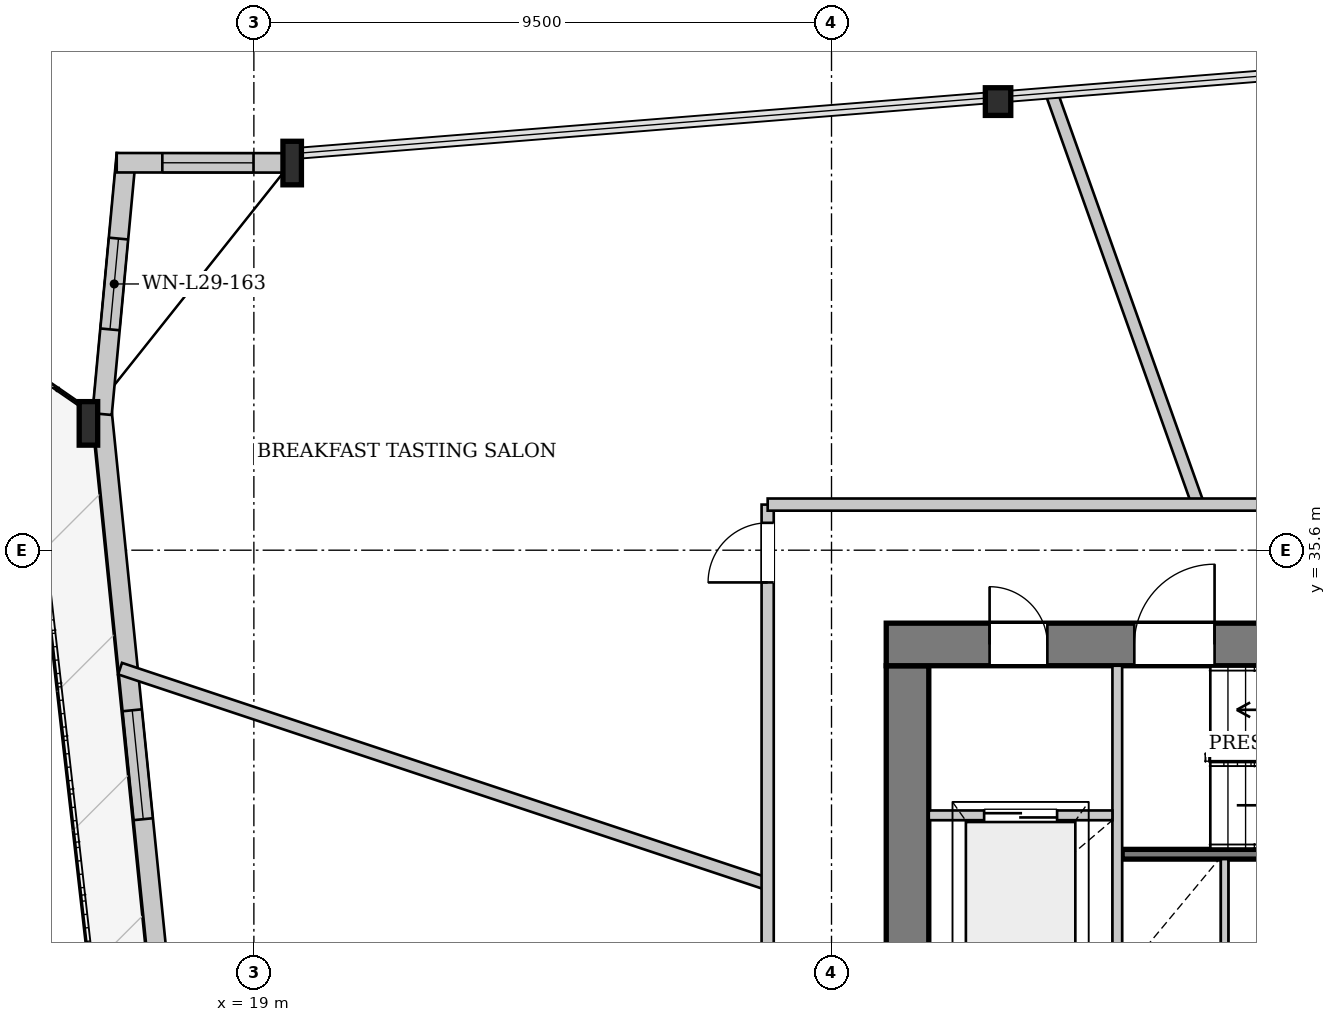
"""IFC4 building model, lengths in metres.
Left out: names, types, materials, properties, quantities, classifications, styles, units other than length and angle.
Written with IfcOpenShell. Run it as: python <this file> out.ifc"""

import sys

from ifc_helpers import new_model, si_unit, direction, frame, frame_2d, origin, origin_2d, place, context, subcontext, project, spatial, rectangle, i_section, extrude, source, transform, mapped, element, fill, save


model = new_model("IFC4")
c1 = context("Model", 3, precision=1e-05, world=origin(), true_north=direction((0.0, 1.0)))
c2 = subcontext(c1, "Body", "Model", "MODEL_VIEW")
j1 = project(units=[si_unit("LENGTHUNIT", "METRE"), si_unit("PLANEANGLEUNIT", "RADIAN")], contexts=[c1])
p1 = place(None, origin())
s1 = spatial("IfcSite", under=j1, at=p1, CompositionType="ELEMENT")
p2 = place(p1, origin())
s2 = spatial("IfcBuilding", under=s1, at=p2, CompositionType="ELEMENT")
p3 = place(p2, frame((0.0, 0.0, 112.8)))
s3 = spatial("IfcBuildingStorey", under=s2, at=p3, CompositionType="ELEMENT", Elevation=112.8)
m1 = source(origin(), c2, "Body", "SweptSolid", [
    extrude(i_section(OverallWidth=0.418, OverallDepth=0.455, WebThickness=0.038, FlangeThickness=0.059, at=origin_2d()), origin(), (0.0, 0.0, 1.0), 3.399),
])
p4 = place(p3, frame((31.369, 43.061, 0.0), z_axis=(-0.076208404136, -0.049129640367, 0.995880794863), x_axis=(0.541838144315, -0.840482852511, 0.0)))
e1 = element("IfcColumn", 1, at=p4, inside=s3, PredefinedType="COLUMN", context=c2, shape_type="MappedRepresentation", body=[
    mapped(m1, transform((0.0, 0.0, 0.0), x_axis=(1.0, 0.0, 0.0), y_axis=(0.0, 1.0, 0.0), z_axis=(0.0, 0.0, 1.0), scale=1.0)),
])
m2 = source(origin(), c2, "Body", "SweptSolid", [
    extrude(i_section(OverallWidth=0.304, OverallDepth=0.716, WebThickness=0.021, FlangeThickness=0.04, at=origin_2d()), origin(), (0.0, 0.0, 1.0), 3.408),
])
p5 = place(p3, frame((19.745, 42.129, 0.0), z_axis=(-0.067332747492, -0.095411935807, 0.993158025503), x_axis=(0.817035854661, -0.5765868644, 0.0)))
e2 = element("IfcColumn", 2, at=p5, inside=s3, PredefinedType="COLUMN", context=c2, shape_type="MappedRepresentation", body=[
    mapped(m2, transform((0.0, 0.0, 0.0), x_axis=(1.0, 0.0, 0.0), y_axis=(0.0, 1.0, 0.0), z_axis=(0.0, 0.0, 1.0), scale=1.0)),
])
m3 = source(origin(), c2, "Body", "SweptSolid", [
    extrude(i_section(OverallWidth=0.304, OverallDepth=0.716, WebThickness=0.021, FlangeThickness=0.04, at=origin_2d()), origin(), (0.0, 0.0, 1.0), 3.404),
])
p6 = place(p3, frame((16.344, 37.854, 0.0), z_axis=(-0.038083007861, -0.098685911143, 0.994389649712), x_axis=(0.9329431075, -0.360023830002, 0.0)))
e3 = element("IfcColumn", 3, at=p6, inside=s3, PredefinedType="COLUMN", context=c2, shape_type="MappedRepresentation", body=[
    mapped(m3, transform((0.0, 0.0, 0.0), x_axis=(1.0, 0.0, 0.0), y_axis=(0.0, 1.0, 0.0), z_axis=(0.0, 0.0, 1.0), scale=1.0)),
])
p7 = place(p3, frame((18.334, 19.781, 0.0), z_axis=(0.0, 0.0, 1.0), x_axis=(-0.1006962092, 0.994917219397, 0.0)))
e4 = element("IfcWall", 4, at=p7, inside=s3, PredefinedType="SOLIDWALL", context=c2, shape_type="SweptSolid", body=[
    extrude(rectangle(XDim=18.182, YDim=0.32, at=frame_2d((9.091, 0.0))), origin(), (0.0, 0.0, 1.0), 2.692),
])
p8 = place(p7, frame((5.268, 0.0, 0.0)))
e5 = element("IfcOpeningElement", 5, at=p8, cuts=e4, PredefinedType="OPENING", context=c2, shape_type="SweptSolid", body=[
    extrude(rectangle(XDim=1.1, YDim=2.3, at=frame_2d((0.55, 1.15))), frame((0.0, 0.17, 0.0), z_axis=(0.0, -1.0, 0.0), x_axis=(1.0, 0.0, 0.0)), (0.0, 0.0, 1.0), 0.34),
])
p9 = place(p7, frame((11.454, 0.0, 0.372)))
e6 = element("IfcOpeningElement", 6, at=p9, cuts=e4, PredefinedType="OPENING", context=c2, shape_type="SweptSolid", body=[
    extrude(rectangle(XDim=1.8, YDim=2.2, at=frame_2d((0.9, 1.1))), frame((0.0, 0.17, 0.0), z_axis=(0.0, -1.0, 0.0), x_axis=(1.0, 0.0, 0.0)), (0.0, 0.0, 1.0), 0.34),
])
p10 = place(p3, frame((16.503, 37.839, 0.0), z_axis=(0.0, 0.0, 1.0), x_axis=(0.093173512917, 0.995649886502, 0.0)))
e7 = element("IfcWall", 7, at=p10, inside=s3, PredefinedType="SOLIDWALL", context=c2, shape_type="SweptSolid", body=[
    extrude(rectangle(XDim=4.297, YDim=0.32, at=frame_2d((2.149, 0.0))), origin(), (0.0, 0.0, 1.0), 2.692),
])
p11 = place(p10, frame((1.399, 0.0, 0.272)))
e8 = element("IfcOpeningElement", 8, at=p11, cuts=e7, PredefinedType="OPENING", context=c2, shape_type="SweptSolid", body=[
    extrude(rectangle(XDim=1.5, YDim=2.3, at=frame_2d((0.75, 1.15))), frame((0.0, 0.17, 0.0), z_axis=(0.0, -1.0, 0.0), x_axis=(1.0, 0.0, 0.0)), (0.0, 0.0, 1.0), 0.34),
])
p12 = place(p3, frame((16.744, 41.972, 0.0), z_axis=(0.0, 0.0, 1.0), x_axis=(0.999999668971, -0.000813669381, 0.0)))
e9 = element("IfcWall", 9, at=p12, inside=s3, PredefinedType="SOLIDWALL", context=c2, shape_type="SweptSolid", body=[
    extrude(rectangle(XDim=3.0, YDim=0.32, at=frame_2d((1.5, 0.0))), origin(), (0.0, 0.0, 1.0), 2.692),
])
p13 = place(p12, frame((0.75, 0.0, 0.272)))
e10 = element("IfcOpeningElement", 10, at=p13, cuts=e9, PredefinedType="OPENING", context=c2, shape_type="SweptSolid", body=[
    extrude(rectangle(XDim=1.5, YDim=2.3, at=frame_2d((0.75, 1.15))), frame((0.0, 0.17, 0.0), z_axis=(0.0, -1.0, 0.0), x_axis=(1.0, 0.0, 0.0)), (0.0, 0.0, 1.0), 0.34),
])
p14 = place(p3, frame((29.75, 19.5, 0.0), z_axis=(0.0, 0.0, 1.0), x_axis=(0.0, 1.0, 0.0)))
e11 = element("IfcWall", 11, at=p14, inside=s3, PredefinedType="SHEAR", context=c2, shape_type="SweptSolid", body=[
    extrude(rectangle(XDim=14.2, YDim=0.7, at=frame_2d((7.1, 0.0))), origin(), (0.0, 0.0, 1.0), 3.3),
])
p15 = place(p14, frame((7.42, 0.0, 0.0)))
e12 = element("IfcOpeningElement", 12, at=p15, cuts=e11, PredefinedType="OPENING", context=c2, shape_type="SweptSolid", body=[
    extrude(rectangle(XDim=1.6, YDim=2.2, at=frame_2d((0.8, 1.1))), frame((0.0, 0.36, 0.0), z_axis=(0.0, -1.0, 0.0), x_axis=(1.0, 0.0, 0.0)), (0.0, 0.0, 1.0), 0.72),
])
p16 = place(p3, frame((29.4, 34.05, 0.0), z_axis=(0.0, 0.0, 1.0), x_axis=(1.0, 0.0, 0.0)))
e13 = element("IfcWall", 13, at=p16, inside=s3, PredefinedType="SHEAR", context=c2, shape_type="SweptSolid", body=[
    extrude(rectangle(XDim=17.2, YDim=0.7, at=frame_2d((8.6, 0.0))), origin(), (0.0, 0.0, 1.0), 3.3),
])
p17 = place(p16, frame((1.7, 0.0, 0.0)))
e14 = element("IfcOpeningElement", 14, at=p17, cuts=e13, PredefinedType="OPENING", context=c2, shape_type="SweptSolid", body=[
    extrude(rectangle(XDim=0.95, YDim=2.1, at=frame_2d((0.475, 1.05))), frame((0.0, 0.36, 0.0), z_axis=(0.0, -1.0, 0.0), x_axis=(1.0, 0.0, 0.0)), (0.0, 0.0, 1.0), 0.72),
])
p18 = place(p16, frame((4.08, 0.0, 0.0)))
e15 = element("IfcOpeningElement", 15, at=p18, cuts=e13, PredefinedType="OPENING", context=c2, shape_type="SweptSolid", body=[
    extrude(rectangle(XDim=1.32, YDim=2.2, at=frame_2d((0.66, 1.1))), frame((0.0, 0.36, 0.0), z_axis=(0.0, -1.0, 0.0), x_axis=(1.0, 0.0, 0.0)), (0.0, 0.0, 1.0), 0.72),
])
p19 = place(p16, frame((15.15, 0.0, 0.0)))
e16 = element("IfcOpeningElement", 16, at=p19, cuts=e13, PredefinedType="OPENING", context=c2, shape_type="SweptSolid", body=[
    extrude(rectangle(XDim=0.95, YDim=2.1, at=frame_2d((0.475, 1.05))), frame((0.0, 0.36, 0.0), z_axis=(0.0, -1.0, 0.0), x_axis=(1.0, 0.0, 0.0)), (0.0, 0.0, 1.0), 0.72),
])
p20 = place(p3, frame((33.28, 30.6, 0.0), z_axis=(0.0, 0.0, 1.0), x_axis=(1.0, 0.0, 0.0)))
e17 = element("IfcWall", 17, at=p20, inside=s3, PredefinedType="PARTITIONING", context=c2, shape_type="SweptSolid", body=[
    extrude(rectangle(XDim=7.3, YDim=0.16, at=frame_2d((3.65, 0.0))), origin(), (0.0, 0.0, 1.0), 3.3),
])
p21 = place(p3, frame((33.2, 28.44, 0.0), z_axis=(0.0, 0.0, 1.0), x_axis=(0.0, 1.0, 0.0)))
e18 = element("IfcWall", 18, at=p21, inside=s3, PredefinedType="PARTITIONING", context=c2, shape_type="SweptSolid", body=[
    extrude(rectangle(XDim=5.26, YDim=0.16, at=frame_2d((2.63, 0.0))), origin(), (0.0, 0.0, 1.0), 3.3),
])
p22 = place(p3, frame((30.1, 31.24, 0.0), z_axis=(0.0, 0.0, 1.0), x_axis=(1.0, 0.0, 0.0)))
e19 = element("IfcWall", 19, at=p22, inside=s3, PredefinedType="PARTITIONING", context=c2, shape_type="SweptSolid", body=[
    extrude(rectangle(XDim=3.02, YDim=0.16, at=frame_2d((1.51, 0.0))), origin(), (0.0, 0.0, 1.0), 3.3),
])
p23 = place(p22, frame((0.91, 0.0, 0.0)))
e20 = element("IfcOpeningElement", 20, at=p23, cuts=e19, PredefinedType="OPENING", context=c2, shape_type="SweptSolid", body=[
    extrude(rectangle(XDim=1.2, YDim=2.2, at=frame_2d((0.6, 1.1))), frame((0.0, 0.09, 0.0), z_axis=(0.0, -1.0, 0.0), x_axis=(1.0, 0.0, 0.0)), (0.0, 0.0, 1.0), 0.18),
])
p24 = place(p3, frame((34.965, 28.6, 0.0), z_axis=(0.0, 0.0, 1.0), x_axis=(0.0, 1.0, 0.0)))
e21 = element("IfcWall", 21, at=p24, inside=s3, PredefinedType="PARTITIONING", context=c2, shape_type="SweptSolid", body=[
    extrude(rectangle(XDim=1.92, YDim=0.125, at=frame_2d((0.96, 0.0))), origin(), (0.0, 0.0, 1.0), 3.3),
])
p25 = place(p3, frame((34.528, 36.35, 0.0), z_axis=(0.0, 0.0, 1.0), x_axis=(-0.335484779228, 0.942045626765, 0.0)))
e22 = element("IfcWall", 22, at=p25, inside=s3, PredefinedType="PARTITIONING", context=c2, shape_type="SweptSolid", body=[
    extrude(rectangle(XDim=7.156, YDim=0.2, at=frame_2d((3.578, 0.0))), origin(), (0.0, 0.0, 1.0), 3.3),
])
p26 = place(p3, frame((27.45, 30.11, 0.0), z_axis=(0.0, 0.0, 1.0), x_axis=(-0.948876702019, 0.315646961598, 0.0)))
e23 = element("IfcWall", 23, at=p26, inside=s3, PredefinedType="PARTITIONING", context=c2, shape_type="SweptSolid", body=[
    extrude(rectangle(XDim=11.224, YDim=0.2, at=frame_2d((5.612, 0.0))), origin(), (0.0, 0.0, 1.0), 3.3),
])
p27 = place(p3, frame((27.45, 16.85, 0.0), z_axis=(0.0, 0.0, 1.0), x_axis=(0.0, 1.0, 0.0)))
e24 = element("IfcWall", 24, at=p27, inside=s3, PredefinedType="PARTITIONING", context=c2, shape_type="SweptSolid", body=[
    extrude(rectangle(XDim=19.5, YDim=0.2, at=frame_2d((9.75, 0.0))), origin(), (0.0, 0.0, 1.0), 3.3),
])
p28 = place(p27, frame((18.22, 0.0, 0.0)))
e25 = element("IfcOpeningElement", 25, at=p28, cuts=e24, PredefinedType="OPENING", context=c2, shape_type="SweptSolid", body=[
    extrude(rectangle(XDim=0.98, YDim=2.15, at=frame_2d((0.49, 1.075))), frame((0.0, 0.11, 0.0), z_axis=(0.0, -1.0, 0.0), x_axis=(1.0, 0.0, 0.0)), (0.0, 0.0, 1.0), 0.22),
])
p29 = place(p27, frame((7.666, 0.0, 0.0)))
e26 = element("IfcOpeningElement", 26, at=p29, cuts=e24, PredefinedType="OPENING", context=c2, shape_type="SweptSolid", body=[
    extrude(rectangle(XDim=0.98, YDim=2.15, at=frame_2d((0.49, 1.075))), frame((0.0, 0.11, 0.0), z_axis=(0.0, -1.0, 0.0), x_axis=(1.0, 0.0, 0.0)), (0.0, 0.0, 1.0), 0.22),
])
p30 = place(p3, frame((27.45, 36.35, 0.0), z_axis=(0.0, 0.0, 1.0), x_axis=(1.0, 0.0, 0.0)))
e27 = element("IfcWall", 27, at=p30, inside=s3, PredefinedType="PARTITIONING", context=c2, shape_type="SweptSolid", body=[
    extrude(rectangle(XDim=21.1, YDim=0.2, at=frame_2d((10.55, 0.0))), origin(), (0.0, 0.0, 1.0), 3.3),
])
p31 = place(p30, frame((19.82, 0.0, 0.0)))
e28 = element("IfcOpeningElement", 28, at=p31, cuts=e27, PredefinedType="OPENING", context=c2, shape_type="SweptSolid", body=[
    extrude(rectangle(XDim=0.98, YDim=2.15, at=frame_2d((0.49, 1.075))), frame((0.0, 0.11, 0.0), z_axis=(0.0, -1.0, 0.0), x_axis=(1.0, 0.0, 0.0)), (0.0, 0.0, 1.0), 0.22),
])
p32 = place(p30, frame((10.695, 0.0, 0.0)))
e29 = element("IfcOpeningElement", 29, at=p32, cuts=e27, PredefinedType="OPENING", context=c2, shape_type="SweptSolid", body=[
    extrude(rectangle(XDim=0.98, YDim=2.15, at=frame_2d((0.49, 1.075))), frame((0.0, 0.11, 0.0), z_axis=(0.0, -1.0, 0.0), x_axis=(1.0, 0.0, 0.0)), (0.0, 0.0, 1.0), 0.22),
])
m4 = source(origin(), c2, "Body", "SweptSolid", [
    extrude(rectangle(XDim=1.8, YDim=2.2, at=frame_2d((0.9, 1.1))), frame((0.0, 0.03, 0.0), z_axis=(0.0, -1.0, 0.0), x_axis=(1.0, 0.0, 0.0)), (0.0, 0.0, 1.0), 0.06),
])
p33 = place(p9, origin())
e30 = element("IfcWindow", 30, at=p33, inside=s3, PartitioningType="SINGLE_PANEL", PredefinedType="WINDOW", context=c2, shape_type="MappedRepresentation", body=[
    mapped(m4, transform((0.0, 0.0, 0.0), x_axis=(1.0, 0.0, 0.0), y_axis=(0.0, 1.0, 0.0), z_axis=(0.0, 0.0, 1.0), scale=1.0)),
])
fill(e6, e30)
m5 = source(origin(), c2, "Body", "SweptSolid", [
    extrude(rectangle(XDim=1.5, YDim=2.3, at=frame_2d((0.75, 1.15))), frame((0.0, 0.03, 0.0), z_axis=(0.0, -1.0, 0.0), x_axis=(1.0, 0.0, 0.0)), (0.0, 0.0, 1.0), 0.06),
])
p34 = place(p11, origin())
e31 = element("IfcWindow", 31, at=p34, inside=s3, PartitioningType="SINGLE_PANEL", PredefinedType="WINDOW", context=c2, shape_type="MappedRepresentation", body=[
    mapped(m5, transform((0.0, 0.0, 0.0), x_axis=(1.0, 0.0, 0.0), y_axis=(0.0, 1.0, 0.0), z_axis=(0.0, 0.0, 1.0), scale=1.0)),
])
fill(e8, e31)
p35 = place(p13, origin())
e32 = element("IfcWindow", 32, at=p35, inside=s3, PartitioningType="SINGLE_PANEL", PredefinedType="WINDOW", context=c2, shape_type="MappedRepresentation", body=[
    mapped(m5, transform((0.0, 0.0, 0.0), x_axis=(1.0, 0.0, 0.0), y_axis=(0.0, 1.0, 0.0), z_axis=(0.0, 0.0, 1.0), scale=1.0)),
])
fill(e10, e32)
m6 = source(origin(), c2, "Body", "SweptSolid", [
    extrude(rectangle(XDim=0.95, YDim=2.1, at=frame_2d((0.475, 1.05))), frame((0.0, 0.025, 0.0), z_axis=(0.0, -1.0, 0.0), x_axis=(1.0, 0.0, 0.0)), (0.0, 0.0, 1.0), 0.05),
])
p36 = place(p17, origin())
e33 = element("IfcDoor", 33, at=p36, inside=s3, OperationType="SINGLE_SWING_LEFT", PredefinedType="DOOR", context=c2, shape_type="MappedRepresentation", body=[
    mapped(m6, transform((0.0, 0.0, 0.0), x_axis=(1.0, 0.0, 0.0), y_axis=(0.0, 1.0, 0.0), z_axis=(0.0, 0.0, 1.0), scale=1.0)),
])
fill(e14, e33)
m7 = source(origin(), c2, "Body", "SweptSolid", [
    extrude(rectangle(XDim=1.32, YDim=2.2, at=frame_2d((0.66, 1.1))), frame((0.0, 0.025, 0.0), z_axis=(0.0, -1.0, 0.0), x_axis=(1.0, 0.0, 0.0)), (0.0, 0.0, 1.0), 0.05),
])
p37 = place(p18, origin())
e34 = element("IfcDoor", 34, at=p37, inside=s3, OperationType="SINGLE_SWING_RIGHT", PredefinedType="DOOR", context=c2, shape_type="MappedRepresentation", body=[
    mapped(m7, transform((0.0, 0.0, 0.0), x_axis=(1.0, 0.0, 0.0), y_axis=(0.0, 1.0, 0.0), z_axis=(0.0, 0.0, 1.0), scale=1.0)),
])
fill(e15, e34)
m8 = source(origin(), c2, "Body", "SweptSolid", [
    extrude(rectangle(XDim=1.2, YDim=2.2, at=frame_2d((0.6, 1.1))), frame((0.0, 0.025, 0.0), z_axis=(0.0, -1.0, 0.0), x_axis=(1.0, 0.0, 0.0)), (0.0, 0.0, 1.0), 0.05),
])
p38 = place(p23, origin())
e35 = element("IfcDoor", 35, at=p38, inside=s3, OperationType="DOUBLE_DOOR_SLIDING", PredefinedType="DOOR", context=c2, shape_type="MappedRepresentation", body=[
    mapped(m8, transform((0.0, 0.0, 0.0), x_axis=(1.0, 0.0, 0.0), y_axis=(0.0, 1.0, 0.0), z_axis=(0.0, 0.0, 1.0), scale=1.0)),
])
fill(e20, e35)
m9 = source(origin(), c2, "Body", "SweptSolid", [
    extrude(rectangle(XDim=0.98, YDim=2.15, at=frame_2d((0.49, 1.075))), frame((0.0, 0.025, 0.0), z_axis=(0.0, -1.0, 0.0), x_axis=(1.0, 0.0, 0.0)), (0.0, 0.0, 1.0), 0.05),
])
p39 = place(p28, origin())
e36 = element("IfcDoor", 36, at=p39, inside=s3, OperationType="SINGLE_SWING_LEFT", PredefinedType="DOOR", context=c2, shape_type="MappedRepresentation", body=[
    mapped(m9, transform((0.0, 0.0, 0.0), x_axis=(1.0, 0.0, 0.0), y_axis=(0.0, 1.0, 0.0), z_axis=(0.0, 0.0, 1.0), scale=1.0)),
])
fill(e25, e36)
save(model, sys.argv[1])
